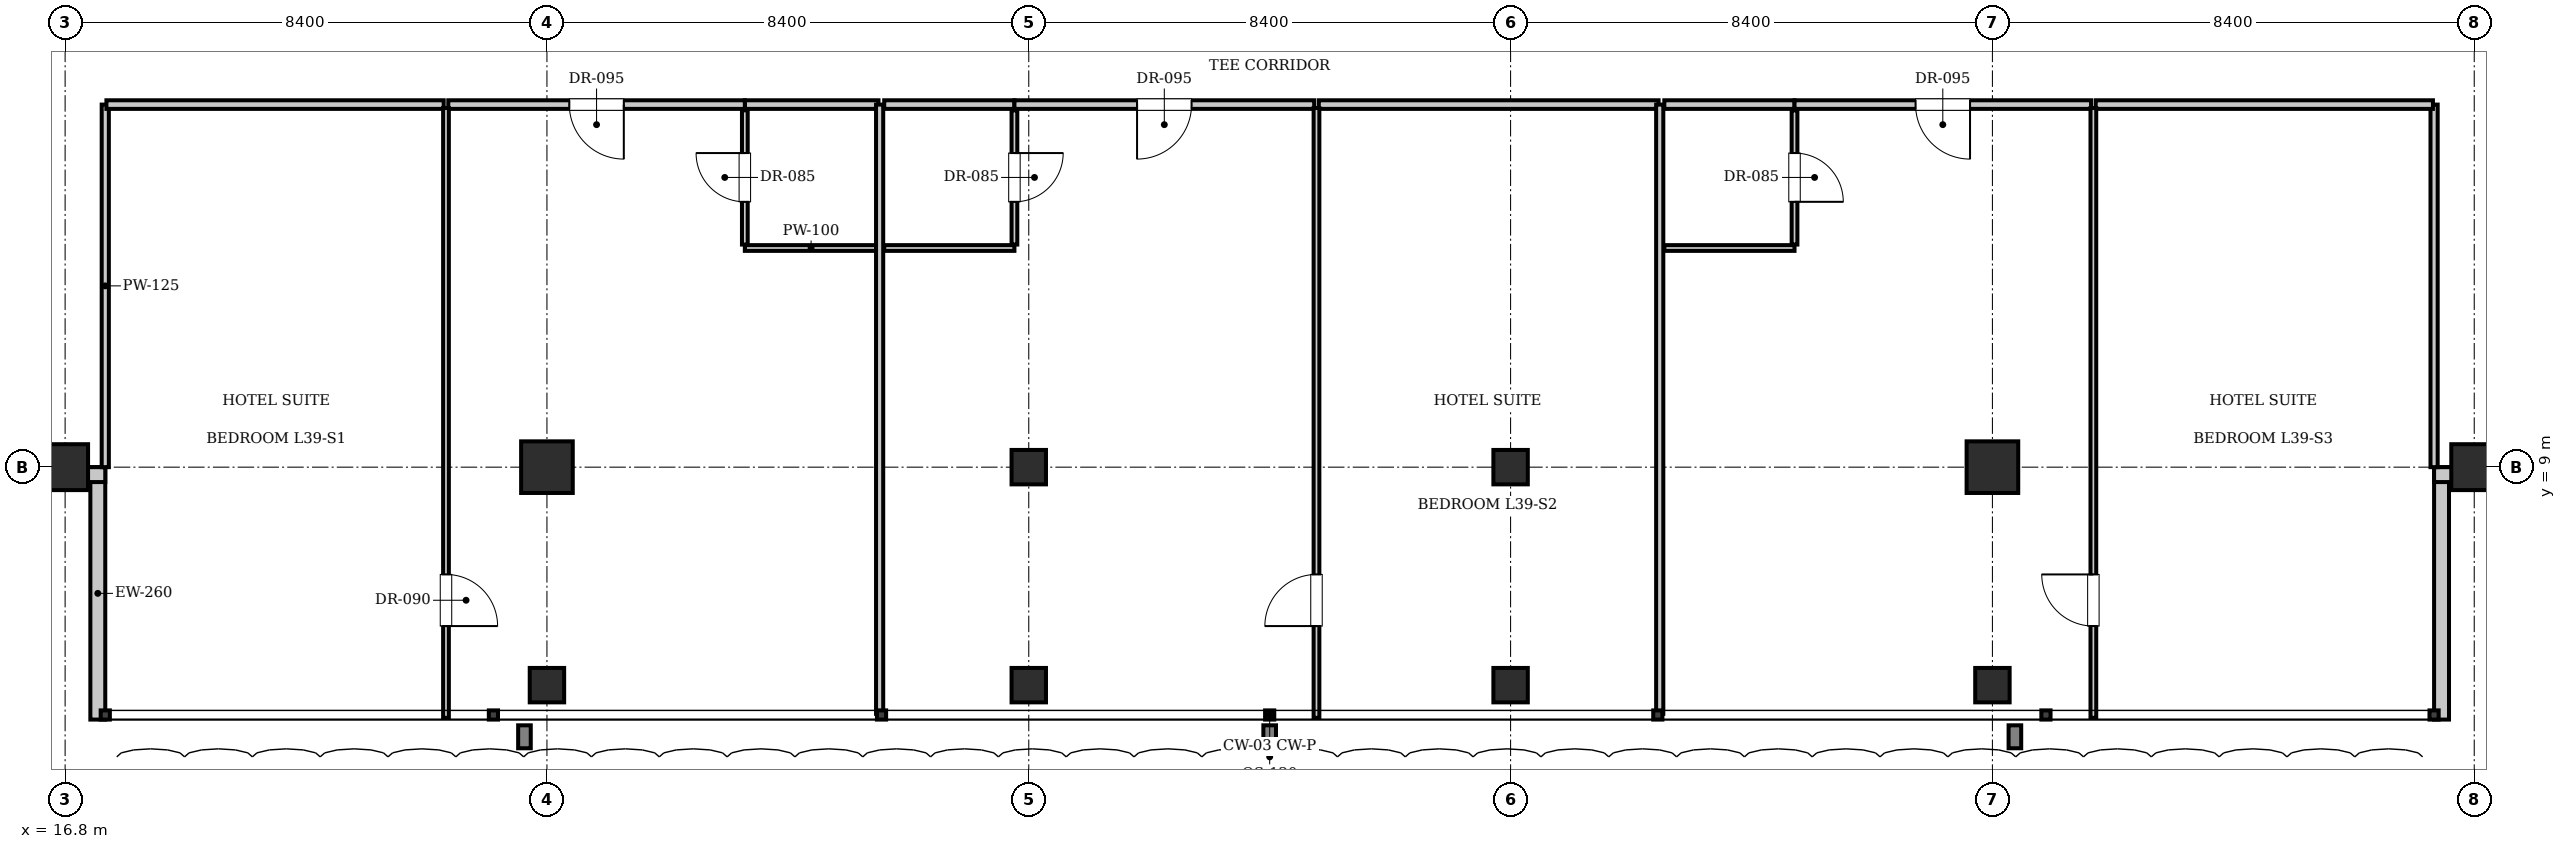
"""IFC4 building model, lengths in metres.
Left out: names, types, materials, properties, quantities, classifications, styles, units other than length and angle.
Written with IfcOpenShell. Run it as: python <this file> out.ifc"""

import sys

from ifc_helpers import new_model, si_unit, direction, frame, frame_2d, origin, origin_2d, place, context, subcontext, project, spatial, rectangle, i_section, extrude, element, fill, save


model = new_model("IFC4")
c1 = context("Model", 3, precision=1e-05, world=origin(), true_north=direction((0.0, 1.0)))
c2 = subcontext(c1, "Body", "Model", "MODEL_VIEW")
j1 = project(units=[si_unit("LENGTHUNIT", "METRE"), si_unit("PLANEANGLEUNIT", "RADIAN")], contexts=[c1])
p1 = place(None, origin())
s1 = spatial("IfcSite", under=j1, at=p1, CompositionType="ELEMENT")
p2 = place(p1, origin())
s2 = spatial("IfcBuilding", under=s1, at=p2, CompositionType="ELEMENT")
p3 = place(p2, frame((0.0, 0.0, 162.05)))
s3 = spatial("IfcBuildingStorey", under=s2, at=p3, CompositionType="ELEMENT", Elevation=162.05)
for number, where, z_axis, x_axis in (
    (1, (25.2, 9.0, 0.0), (0.0, 0.0, 1.0), (1.0, 0.0, 0.0)),
    (2, (50.4, 9.0, 0.0), (0.0, 0.0, 1.0), (1.0, 0.0, 0.0)),
):
    element("IfcColumn", number, at=place(p3, frame(where, z_axis=z_axis, x_axis=x_axis)), inside=s3, PredefinedType="COLUMN", context=c2, shape_type="SweptSolid", body=[
        extrude(rectangle(XDim=0.9, YDim=0.9, at=origin_2d()), origin(), (0.0, 0.0, 1.0), 3.85),
    ])
for number, where, z_axis, x_axis in (
    (3, (33.6, 9.0, 0.0), (0.0, 0.0, 1.0), (1.0, 0.0, 0.0)),
    (4, (42.0, 9.0, 0.0), (0.0, 0.0, 1.0), (1.0, 0.0, 0.0)),
):
    element("IfcColumn", number, at=place(p3, frame(where, z_axis=z_axis, x_axis=x_axis)), inside=s3, PredefinedType="COLUMN", context=c2, shape_type="SweptSolid", body=[
        extrude(i_section(OverallWidth=0.6, OverallDepth=0.6, WebThickness=0.025, FlangeThickness=0.038, at=origin_2d()), origin(), (0.0, 0.0, 1.0), 3.85),
    ])
for number, where, z_axis, x_axis in (
    (5, (16.8, 9.0, 0.0), (0.0, 0.0, 1.0), (1.0, 0.0, 0.0)),
    (6, (58.8, 9.0, 0.0), (0.0, 0.0, 1.0), (1.0, 0.0, 0.0)),
):
    element("IfcColumn", number, at=place(p3, frame(where, z_axis=z_axis, x_axis=x_axis)), inside=s3, PredefinedType="COLUMN", context=c2, shape_type="SweptSolid", body=[
        extrude(rectangle(XDim=0.8, YDim=0.8, at=origin_2d()), origin(), (0.0, 0.0, 1.0), 3.85),
    ])
for number, where, z_axis, x_axis in (
    (7, (25.2, 5.2, 0.0), (0.0, 0.0, 1.0), (1.0, 0.0, 0.0)),
    (8, (33.6, 5.2, 0.0), (0.0, 0.0, 1.0), (1.0, 0.0, 0.0)),
    (9, (42.0, 5.2, 0.0), (0.0, 0.0, 1.0), (1.0, 0.0, 0.0)),
    (10, (50.4, 5.2, 0.0), (0.0, 0.0, 1.0), (1.0, 0.0, 0.0)),
):
    element("IfcColumn", number, at=place(p3, frame(where, z_axis=z_axis, x_axis=x_axis)), inside=s3, PredefinedType="COLUMN", context=c2, shape_type="SweptSolid", body=[
        extrude(i_section(OverallWidth=0.6, OverallDepth=0.6, WebThickness=0.025, FlangeThickness=0.038, at=origin_2d()), origin(), (0.0, 0.0, 1.0), 3.85),
    ])
p4 = place(p3, frame((17.37, 4.6, 0.0), z_axis=(0.0, 0.0, 1.0), x_axis=(0.0, 1.0, 0.0)))
e11 = element("IfcWall", 11, at=p4, inside=s3, PredefinedType="SOLIDWALL", context=c2, shape_type="SweptSolid", body=[
    extrude(rectangle(XDim=4.4, YDim=0.26, at=frame_2d((2.2, 0.0))), origin(), (0.0, 0.0, 1.0), 3.61),
])
p5 = place(p3, frame((17.5, 8.87, 0.0), z_axis=(0.0, 0.0, 1.0), x_axis=(-1.0, 0.0, 0.0)))
e12 = element("IfcWall", 12, at=p5, inside=s3, PredefinedType="SOLIDWALL", context=c2, shape_type="SweptSolid", body=[
    extrude(rectangle(XDim=4.4, YDim=0.26, at=frame_2d((2.2, 0.0))), origin(), (0.0, 0.0, 1.0), 3.007),
])
p6 = place(p3, frame((58.23, 9.0, 0.0), z_axis=(0.0, 0.0, 1.0), x_axis=(0.0, -1.0, 0.0)))
e13 = element("IfcWall", 13, at=p6, inside=s3, PredefinedType="SOLIDWALL", context=c2, shape_type="SweptSolid", body=[
    extrude(rectangle(XDim=4.4, YDim=0.26, at=frame_2d((2.2, 0.0))), origin(), (0.0, 0.0, 1.0), 3.61),
])
p7 = place(p3, frame((62.5, 8.87, 0.0), z_axis=(0.0, 0.0, 1.0), x_axis=(-1.0, 0.0, 0.0)))
e14 = element("IfcWall", 14, at=p7, inside=s3, PredefinedType="SOLIDWALL", context=c2, shape_type="SweptSolid", body=[
    extrude(rectangle(XDim=4.4, YDim=0.26, at=frame_2d((2.2, 0.0))), origin(), (0.0, 0.0, 1.0), 3.007),
])
for number, where, z_axis, x_axis in (
    (15, (17.5, 9.0, 0.0), (0.0, 0.0, 1.0), (0.0, 1.0, 0.0)),
    (16, (58.1, 9.0, 0.0), (0.0, 0.0, 1.0), (0.0, 1.0, 0.0)),
):
    element("IfcWall", number, at=place(p3, frame(where, z_axis=z_axis, x_axis=x_axis)), inside=s3, PredefinedType="PARTITIONING", context=c2, shape_type="SweptSolid", body=[
        extrude(rectangle(XDim=6.32, YDim=0.125, at=frame_2d((3.16, 0.0))), origin(), (0.0, 0.0, 1.0), 3.61),
    ])
p8 = place(p3, frame((28.65, 15.32, 0.0), z_axis=(0.0, 0.0, 1.0), x_axis=(1.0, 0.0, 0.0)))
e17 = element("IfcWall", 17, at=p8, inside=s3, PredefinedType="PARTITIONING", context=c2, shape_type="SweptSolid", body=[
    extrude(rectangle(XDim=2.33, YDim=0.15, at=frame_2d((1.165, 0.0))), origin(), (0.0, 0.0, 1.0), 3.61),
])
p9 = place(p3, frame((28.65, 12.82, 0.0), z_axis=(0.0, 0.0, 1.0), x_axis=(1.0, 0.0, 0.0)))
e18 = element("IfcWall", 18, at=p9, inside=s3, PredefinedType="PARTITIONING", context=c2, shape_type="SweptSolid", body=[
    extrude(rectangle(XDim=2.31, YDim=0.1, at=frame_2d((1.155, 0.0))), origin(), (0.0, 0.0, 1.0), 3.61),
])
p10 = place(p3, frame((28.65, 12.88, 0.0), z_axis=(0.0, 0.0, 1.0), x_axis=(0.0, 1.0, 0.0)))
e19 = element("IfcWall", 19, at=p10, inside=s3, PredefinedType="PARTITIONING", context=c2, shape_type="SweptSolid", body=[
    extrude(rectangle(XDim=2.34, YDim=0.1, at=frame_2d((1.17, 0.0))), origin(), (0.0, 0.0, 1.0), 3.61),
])
p11 = place(p10, frame((0.745, 0.0, 0.0)))
e20 = element("IfcOpeningElement", 20, at=p11, cuts=e19, PredefinedType="OPENING", context=c2, shape_type="SweptSolid", body=[
    extrude(rectangle(XDim=0.85, YDim=2.1, at=frame_2d((0.425, 1.05))), frame((0.0, 0.06, 0.0), z_axis=(0.0, -1.0, 0.0), x_axis=(1.0, 0.0, 0.0)), (0.0, 0.0, 1.0), 0.12),
])
p12 = place(p3, frame((17.52, 15.32, 0.0), z_axis=(0.0, 0.0, 1.0), x_axis=(1.0, 0.0, 0.0)))
e21 = element("IfcWall", 21, at=p12, inside=s3, PredefinedType="PARTITIONING", context=c2, shape_type="SweptSolid", body=[
    extrude(rectangle(XDim=5.88, YDim=0.15, at=frame_2d((2.94, 0.0))), origin(), (0.0, 0.0, 1.0), 3.61),
])
p13 = place(p3, frame((23.48, 15.32, 0.0), z_axis=(0.0, 0.0, 1.0), x_axis=(1.0, 0.0, 0.0)))
e22 = element("IfcWall", 22, at=p13, inside=s3, PredefinedType="PARTITIONING", context=c2, shape_type="SweptSolid", body=[
    extrude(rectangle(XDim=5.17, YDim=0.15, at=frame_2d((2.585, 0.0))), origin(), (0.0, 0.0, 1.0), 3.61),
])
p14 = place(p13, frame((2.11, 0.0, 0.0)))
e23 = element("IfcOpeningElement", 23, at=p14, cuts=e22, PredefinedType="OPENING", context=c2, shape_type="SweptSolid", body=[
    extrude(rectangle(XDim=0.95, YDim=2.15, at=frame_2d((0.475, 1.075))), frame((0.0, 0.085, 0.0), z_axis=(0.0, -1.0, 0.0), x_axis=(1.0, 0.0, 0.0)), (0.0, 0.0, 1.0), 0.17),
])
p15 = place(p3, frame((23.44, 4.63, 0.0), z_axis=(0.0, 0.0, 1.0), x_axis=(0.0, 1.0, 0.0)))
e24 = element("IfcWall", 24, at=p15, inside=s3, PredefinedType="PARTITIONING", context=c2, shape_type="SweptSolid", body=[
    extrude(rectangle(XDim=10.63, YDim=0.1, at=frame_2d((5.315, 0.0))), origin(), (0.0, 0.0, 1.0), 3.61),
])
p16 = place(p15, frame((1.6, 0.0, 0.0)))
e25 = element("IfcOpeningElement", 25, at=p16, cuts=e24, PredefinedType="OPENING", context=c2, shape_type="SweptSolid", body=[
    extrude(rectangle(XDim=0.9, YDim=2.1, at=frame_2d((0.45, 1.05))), frame((0.0, 0.06, 0.0), z_axis=(0.0, -1.0, 0.0), x_axis=(1.0, 0.0, 0.0)), (0.0, 0.0, 1.0), 0.12),
])
p17 = place(p3, frame((31.0, 4.7, 0.0), z_axis=(0.0, 0.0, 1.0), x_axis=(0.0, 1.0, 0.0)))
e26 = element("IfcWall", 26, at=p17, inside=s3, PredefinedType="PARTITIONING", context=c2, shape_type="SweptSolid", body=[
    extrude(rectangle(XDim=10.62, YDim=0.125, at=frame_2d((5.31, 0.0))), origin(), (0.0, 0.0, 1.0), 3.61),
])
p18 = place(p3, frame((31.08, 15.32, 0.0), z_axis=(0.0, 0.0, 1.0), x_axis=(1.0, 0.0, 0.0)))
e27 = element("IfcWall", 27, at=p18, inside=s3, PredefinedType="PARTITIONING", context=c2, shape_type="SweptSolid", body=[
    extrude(rectangle(XDim=2.27, YDim=0.15, at=frame_2d((1.135, 0.0))), origin(), (0.0, 0.0, 1.0), 3.61),
])
p19 = place(p3, frame((31.08, 12.82, 0.0), z_axis=(0.0, 0.0, 1.0), x_axis=(1.0, 0.0, 0.0)))
e28 = element("IfcWall", 28, at=p19, inside=s3, PredefinedType="PARTITIONING", context=c2, shape_type="SweptSolid", body=[
    extrude(rectangle(XDim=2.27, YDim=0.1, at=frame_2d((1.135, 0.0))), origin(), (0.0, 0.0, 1.0), 3.61),
])
p20 = place(p3, frame((33.35, 12.88, 0.0), z_axis=(0.0, 0.0, 1.0), x_axis=(0.0, 1.0, 0.0)))
e29 = element("IfcWall", 29, at=p20, inside=s3, PredefinedType="PARTITIONING", context=c2, shape_type="SweptSolid", body=[
    extrude(rectangle(XDim=2.34, YDim=0.1, at=frame_2d((1.17, 0.0))), origin(), (0.0, 0.0, 1.0), 3.61),
])
p21 = place(p20, frame((0.745, 0.0, 0.0)))
e30 = element("IfcOpeningElement", 30, at=p21, cuts=e29, PredefinedType="OPENING", context=c2, shape_type="SweptSolid", body=[
    extrude(rectangle(XDim=0.85, YDim=2.1, at=frame_2d((0.425, 1.05))), frame((0.0, 0.06, 0.0), z_axis=(0.0, -1.0, 0.0), x_axis=(1.0, 0.0, 0.0)), (0.0, 0.0, 1.0), 0.12),
])
p22 = place(p3, frame((33.35, 15.32, 0.0), z_axis=(0.0, 0.0, 1.0), x_axis=(1.0, 0.0, 0.0)))
e31 = element("IfcWall", 31, at=p22, inside=s3, PredefinedType="PARTITIONING", context=c2, shape_type="SweptSolid", body=[
    extrude(rectangle(XDim=5.226, YDim=0.15, at=frame_2d((2.613, 0.0))), origin(), (0.0, 0.0, 1.0), 3.61),
])
p23 = place(p22, frame((2.138, 0.0, 0.0)))
e32 = element("IfcOpeningElement", 32, at=p23, cuts=e31, PredefinedType="OPENING", context=c2, shape_type="SweptSolid", body=[
    extrude(rectangle(XDim=0.95, YDim=2.15, at=frame_2d((0.475, 1.075))), frame((0.0, 0.085, 0.0), z_axis=(0.0, -1.0, 0.0), x_axis=(1.0, 0.0, 0.0)), (0.0, 0.0, 1.0), 0.17),
])
p24 = place(p3, frame((38.656, 15.32, 0.0), z_axis=(0.0, 0.0, 1.0), x_axis=(1.0, 0.0, 0.0)))
e33 = element("IfcWall", 33, at=p24, inside=s3, PredefinedType="PARTITIONING", context=c2, shape_type="SweptSolid", body=[
    extrude(rectangle(XDim=5.924, YDim=0.15, at=frame_2d((2.962, 0.0))), origin(), (0.0, 0.0, 1.0), 3.61),
])
p25 = place(p3, frame((38.616, 4.63, 0.0), z_axis=(0.0, 0.0, 1.0), x_axis=(0.0, 1.0, 0.0)))
e34 = element("IfcWall", 34, at=p25, inside=s3, PredefinedType="PARTITIONING", context=c2, shape_type="SweptSolid", body=[
    extrude(rectangle(XDim=10.63, YDim=0.1, at=frame_2d((5.315, 0.0))), origin(), (0.0, 0.0, 1.0), 3.61),
])
p26 = place(p25, frame((1.6, 0.0, 0.0)))
e35 = element("IfcOpeningElement", 35, at=p26, cuts=e34, PredefinedType="OPENING", context=c2, shape_type="SweptSolid", body=[
    extrude(rectangle(XDim=0.9, YDim=2.1, at=frame_2d((0.45, 1.05))), frame((0.0, 0.06, 0.0), z_axis=(0.0, -1.0, 0.0), x_axis=(1.0, 0.0, 0.0)), (0.0, 0.0, 1.0), 0.12),
])
p27 = place(p3, frame((44.6, 4.7, 0.0), z_axis=(0.0, 0.0, 1.0), x_axis=(0.0, 1.0, 0.0)))
e36 = element("IfcWall", 36, at=p27, inside=s3, PredefinedType="PARTITIONING", context=c2, shape_type="SweptSolid", body=[
    extrude(rectangle(XDim=10.62, YDim=0.125, at=frame_2d((5.31, 0.0))), origin(), (0.0, 0.0, 1.0), 3.61),
])
p28 = place(p3, frame((44.68, 15.32, 0.0), z_axis=(0.0, 0.0, 1.0), x_axis=(1.0, 0.0, 0.0)))
e37 = element("IfcWall", 37, at=p28, inside=s3, PredefinedType="PARTITIONING", context=c2, shape_type="SweptSolid", body=[
    extrude(rectangle(XDim=2.27, YDim=0.15, at=frame_2d((1.135, 0.0))), origin(), (0.0, 0.0, 1.0), 3.61),
])
p29 = place(p3, frame((44.68, 12.82, 0.0), z_axis=(0.0, 0.0, 1.0), x_axis=(1.0, 0.0, 0.0)))
e38 = element("IfcWall", 38, at=p29, inside=s3, PredefinedType="PARTITIONING", context=c2, shape_type="SweptSolid", body=[
    extrude(rectangle(XDim=2.27, YDim=0.1, at=frame_2d((1.135, 0.0))), origin(), (0.0, 0.0, 1.0), 3.61),
])
p30 = place(p3, frame((46.95, 12.88, 0.0), z_axis=(0.0, 0.0, 1.0), x_axis=(0.0, 1.0, 0.0)))
e39 = element("IfcWall", 39, at=p30, inside=s3, PredefinedType="PARTITIONING", context=c2, shape_type="SweptSolid", body=[
    extrude(rectangle(XDim=2.34, YDim=0.1, at=frame_2d((1.17, 0.0))), origin(), (0.0, 0.0, 1.0), 3.61),
])
p31 = place(p30, frame((0.745, 0.0, 0.0)))
e40 = element("IfcOpeningElement", 40, at=p31, cuts=e39, PredefinedType="OPENING", context=c2, shape_type="SweptSolid", body=[
    extrude(rectangle(XDim=0.85, YDim=2.1, at=frame_2d((0.425, 1.05))), frame((0.0, 0.06, 0.0), z_axis=(0.0, -1.0, 0.0), x_axis=(1.0, 0.0, 0.0)), (0.0, 0.0, 1.0), 0.12),
])
p32 = place(p3, frame((46.95, 15.32, 0.0), z_axis=(0.0, 0.0, 1.0), x_axis=(1.0, 0.0, 0.0)))
e41 = element("IfcWall", 41, at=p32, inside=s3, PredefinedType="PARTITIONING", context=c2, shape_type="SweptSolid", body=[
    extrude(rectangle(XDim=5.17, YDim=0.15, at=frame_2d((2.585, 0.0))), origin(), (0.0, 0.0, 1.0), 3.61),
])
p33 = place(p32, frame((2.11, 0.0, 0.0)))
e42 = element("IfcOpeningElement", 42, at=p33, cuts=e41, PredefinedType="OPENING", context=c2, shape_type="SweptSolid", body=[
    extrude(rectangle(XDim=0.95, YDim=2.15, at=frame_2d((0.475, 1.075))), frame((0.0, 0.085, 0.0), z_axis=(0.0, -1.0, 0.0), x_axis=(1.0, 0.0, 0.0)), (0.0, 0.0, 1.0), 0.17),
])
p34 = place(p3, frame((52.2, 15.32, 0.0), z_axis=(0.0, 0.0, 1.0), x_axis=(1.0, 0.0, 0.0)))
e43 = element("IfcWall", 43, at=p34, inside=s3, PredefinedType="PARTITIONING", context=c2, shape_type="SweptSolid", body=[
    extrude(rectangle(XDim=5.88, YDim=0.15, at=frame_2d((2.94, 0.0))), origin(), (0.0, 0.0, 1.0), 3.61),
])
p35 = place(p3, frame((52.16, 4.63, 0.0), z_axis=(0.0, 0.0, 1.0), x_axis=(0.0, 1.0, 0.0)))
e44 = element("IfcWall", 44, at=p35, inside=s3, PredefinedType="PARTITIONING", context=c2, shape_type="SweptSolid", body=[
    extrude(rectangle(XDim=10.63, YDim=0.1, at=frame_2d((5.315, 0.0))), origin(), (0.0, 0.0, 1.0), 3.61),
])
p36 = place(p35, frame((1.6, 0.0, 0.0)))
e45 = element("IfcOpeningElement", 45, at=p36, cuts=e44, PredefinedType="OPENING", context=c2, shape_type="SweptSolid", body=[
    extrude(rectangle(XDim=0.9, YDim=2.1, at=frame_2d((0.45, 1.05))), frame((0.0, 0.06, 0.0), z_axis=(0.0, -1.0, 0.0), x_axis=(1.0, 0.0, 0.0)), (0.0, 0.0, 1.0), 0.12),
])
p37 = place(p11, origin())
e46 = element("IfcDoor", 46, at=p37, inside=s3, OperationType="SINGLE_SWING_RIGHT", PredefinedType="DOOR", context=c2, shape_type="SweptSolid", body=[
    extrude(rectangle(XDim=0.85, YDim=2.1, at=frame_2d((0.425, 1.05))), frame((0.0, 0.025, 0.0), z_axis=(0.0, -1.0, 0.0), x_axis=(1.0, 0.0, 0.0)), (0.0, 0.0, 1.0), 0.05),
])
fill(e20, e46)
p38 = place(p14, frame((0.95, 0.0, 0.0), z_axis=(0.0, 0.0, 1.0), x_axis=(-1.0, 0.0, 0.0)))
e47 = element("IfcDoor", 47, at=p38, inside=s3, OperationType="SINGLE_SWING_LEFT", PredefinedType="DOOR", context=c2, shape_type="SweptSolid", body=[
    extrude(rectangle(XDim=0.95, YDim=2.15, at=frame_2d((0.475, 1.075))), frame((0.0, 0.025, 0.0), z_axis=(0.0, -1.0, 0.0), x_axis=(1.0, 0.0, 0.0)), (0.0, 0.0, 1.0), 0.05),
])
fill(e23, e47)
p39 = place(p16, frame((0.9, 0.0, 0.0), z_axis=(0.0, 0.0, 1.0), x_axis=(-1.0, 0.0, 0.0)))
e48 = element("IfcDoor", 48, at=p39, inside=s3, OperationType="SINGLE_SWING_RIGHT", PredefinedType="DOOR", context=c2, shape_type="SweptSolid", body=[
    extrude(rectangle(XDim=0.9, YDim=2.1, at=frame_2d((0.45, 1.05))), frame((0.0, 0.025, 0.0), z_axis=(0.0, -1.0, 0.0), x_axis=(1.0, 0.0, 0.0)), (0.0, 0.0, 1.0), 0.05),
])
fill(e25, e48)
p40 = place(p21, frame((0.85, 0.0, 0.0), z_axis=(0.0, 0.0, 1.0), x_axis=(-1.0, 0.0, 0.0)))
e49 = element("IfcDoor", 49, at=p40, inside=s3, OperationType="SINGLE_SWING_LEFT", PredefinedType="DOOR", context=c2, shape_type="SweptSolid", body=[
    extrude(rectangle(XDim=0.85, YDim=2.1, at=frame_2d((0.425, 1.05))), frame((0.0, 0.025, 0.0), z_axis=(0.0, -1.0, 0.0), x_axis=(1.0, 0.0, 0.0)), (0.0, 0.0, 1.0), 0.05),
])
fill(e30, e49)
p41 = place(p23, frame((0.95, 0.0, 0.0), z_axis=(0.0, 0.0, 1.0), x_axis=(-1.0, 0.0, 0.0)))
e50 = element("IfcDoor", 50, at=p41, inside=s3, OperationType="SINGLE_SWING_RIGHT", PredefinedType="DOOR", context=c2, shape_type="SweptSolid", body=[
    extrude(rectangle(XDim=0.95, YDim=2.15, at=frame_2d((0.475, 1.075))), frame((0.0, 0.025, 0.0), z_axis=(0.0, -1.0, 0.0), x_axis=(1.0, 0.0, 0.0)), (0.0, 0.0, 1.0), 0.05),
])
fill(e32, e50)
p42 = place(p26, origin())
e51 = element("IfcDoor", 51, at=p42, inside=s3, OperationType="SINGLE_SWING_LEFT", PredefinedType="DOOR", context=c2, shape_type="SweptSolid", body=[
    extrude(rectangle(XDim=0.9, YDim=2.1, at=frame_2d((0.45, 1.05))), frame((0.0, 0.025, 0.0), z_axis=(0.0, -1.0, 0.0), x_axis=(1.0, 0.0, 0.0)), (0.0, 0.0, 1.0), 0.05),
])
fill(e35, e51)
p43 = place(p31, frame((0.85, 0.0, 0.0), z_axis=(0.0, 0.0, 1.0), x_axis=(-1.0, 0.0, 0.0)))
e52 = element("IfcDoor", 52, at=p43, inside=s3, OperationType="SINGLE_SWING_RIGHT", PredefinedType="DOOR", context=c2, shape_type="SweptSolid", body=[
    extrude(rectangle(XDim=0.85, YDim=2.1, at=frame_2d((0.425, 1.05))), frame((0.0, 0.025, 0.0), z_axis=(0.0, -1.0, 0.0), x_axis=(1.0, 0.0, 0.0)), (0.0, 0.0, 1.0), 0.05),
])
fill(e40, e52)
p44 = place(p33, frame((0.95, 0.0, 0.0), z_axis=(0.0, 0.0, 1.0), x_axis=(-1.0, 0.0, 0.0)))
e53 = element("IfcDoor", 53, at=p44, inside=s3, OperationType="SINGLE_SWING_LEFT", PredefinedType="DOOR", context=c2, shape_type="SweptSolid", body=[
    extrude(rectangle(XDim=0.95, YDim=2.15, at=frame_2d((0.475, 1.075))), frame((0.0, 0.025, 0.0), z_axis=(0.0, -1.0, 0.0), x_axis=(1.0, 0.0, 0.0)), (0.0, 0.0, 1.0), 0.05),
])
fill(e42, e53)
p45 = place(p36, origin())
e54 = element("IfcDoor", 54, at=p45, inside=s3, OperationType="SINGLE_SWING_RIGHT", PredefinedType="DOOR", context=c2, shape_type="SweptSolid", body=[
    extrude(rectangle(XDim=0.9, YDim=2.1, at=frame_2d((0.45, 1.05))), frame((0.0, 0.025, 0.0), z_axis=(0.0, -1.0, 0.0), x_axis=(1.0, 0.0, 0.0)), (0.0, 0.0, 1.0), 0.05),
])
fill(e45, e54)
save(model, sys.argv[1])
